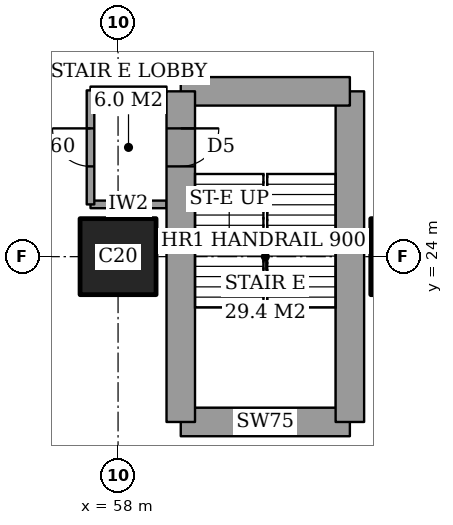
"""IFC4 building model, lengths in metres.
Left out: names, types, materials, properties, quantities, classifications, styles, units other than length and angle.
Written with IfcOpenShell. Run it as: python <this file> out.ifc"""

import sys

from ifc_helpers import new_model, si_unit, direction, frame, frame_2d, origin, origin_2d, place, context, subcontext, project, spatial, rectangle, extrude, element, fill, save


model = new_model("IFC4")
c1 = context("Model", 3, precision=1e-05, world=origin(), true_north=direction((0.0, 1.0)))
c2 = subcontext(c1, "Body", "Model", "MODEL_VIEW")
j1 = project(units=[si_unit("LENGTHUNIT", "METRE"), si_unit("PLANEANGLEUNIT", "RADIAN")], contexts=[c1])
p1 = place(None, origin())
s1 = spatial("IfcSite", under=j1, at=p1, CompositionType="ELEMENT")
p2 = place(p1, origin())
s2 = spatial("IfcBuilding", under=s1, at=p2, CompositionType="ELEMENT")
p3 = place(p2, frame((0.0, 0.0, -5.0)))
s3 = spatial("IfcBuildingStorey", under=s2, at=p3, CompositionType="ELEMENT", Elevation=-5.0)
for number, where, z_axis, x_axis in (
    (1, (58.0, 24.0, 0.0), (0.0, 0.0, 1.0), (1.0, 0.0, 0.0)),
    (2, (65.65, 24.0, 0.0), (0.0, 0.0, 1.0), (1.0, 0.0, 0.0)),
):
    element("IfcColumn", number, at=place(p3, frame(where, z_axis=z_axis, x_axis=x_axis)), inside=s3, PredefinedType="COLUMN", context=c2, shape_type="SweptSolid", body=[
        extrude(rectangle(XDim=2.0, YDim=2.0, at=origin_2d()), origin(), (0.0, 0.0, 1.0), 5.0),
    ])
p4 = place(p3, frame((59.65, 19.65, 0.0), z_axis=(0.0, 0.0, 1.0), x_axis=(1.0, 0.0, 0.0)))
e3 = element("IfcWall", 3, at=p4, inside=s3, PredefinedType="SHEAR", context=c2, shape_type="SweptSolid", body=[
    extrude(rectangle(XDim=4.45, YDim=0.75, at=frame_2d((2.225, 0.0))), origin(), (0.0, 0.0, 1.0), 5.0),
])
p5 = place(p3, frame((64.1, 19.65, 0.0), z_axis=(0.0, 0.0, 1.0), x_axis=(0.0, 1.0, 0.0)))
e4 = element("IfcWall", 4, at=p5, inside=s3, PredefinedType="SHEAR", context=c2, shape_type="SweptSolid", body=[
    extrude(rectangle(XDim=8.7, YDim=0.75, at=frame_2d((4.35, 0.0))), origin(), (0.0, 0.0, 1.0), 5.0),
])
p6 = place(p3, frame((64.1, 28.35, 0.0), z_axis=(0.0, 0.0, 1.0), x_axis=(-1.0, 0.0, 0.0)))
e5 = element("IfcWall", 5, at=p6, inside=s3, PredefinedType="SHEAR", context=c2, shape_type="SweptSolid", body=[
    extrude(rectangle(XDim=4.45, YDim=0.75, at=frame_2d((2.225, 0.0))), origin(), (0.0, 0.0, 1.0), 5.0),
])
p7 = place(p3, frame((59.65, 28.35, 0.0), z_axis=(0.0, 0.0, 1.0), x_axis=(0.0, -1.0, 0.0)))
e6 = element("IfcWall", 6, at=p7, inside=s3, PredefinedType="SHEAR", context=c2, shape_type="SweptSolid", body=[
    extrude(rectangle(XDim=8.7, YDim=0.75, at=frame_2d((4.35, 0.0))), origin(), (0.0, 0.0, 1.0), 5.0),
])
p8 = place(p7, frame((0.975, 0.0, 0.0)))
e7 = element("IfcOpeningElement", 7, at=p8, cuts=e6, PredefinedType="OPENING", context=c2, shape_type="SweptSolid", body=[
    extrude(rectangle(XDim=1.0, YDim=2.1, at=frame_2d((0.5, 1.05))), frame((0.0, 0.385, 0.0), z_axis=(0.0, -1.0, 0.0), x_axis=(1.0, 0.0, 0.0)), (0.0, 0.0, 1.0), 0.77),
])
for number, where, z_axis, x_axis in (
    (8, (57.275, 25.375, 0.0), (0.0, 0.0, 1.0), (1.0, 0.0, 0.0)),
    (9, (57.275, 28.375, 0.0), (0.0, 0.0, 1.0), (1.0, 0.0, 0.0)),
):
    element("IfcWall", number, at=place(p3, frame(where, z_axis=z_axis, x_axis=x_axis)), inside=s3, PredefinedType="PARTITIONING", context=c2, shape_type="SweptSolid", body=[
        extrude(rectangle(XDim=2.0, YDim=0.2, at=frame_2d((1.0, 0.0))), origin(), (0.0, 0.0, 1.0), 4.7),
    ])
p9 = place(p3, frame((57.275, 25.375, 0.0), z_axis=(0.0, 0.0, 1.0), x_axis=(0.0, 1.0, 0.0)))
e10 = element("IfcWall", 10, at=p9, inside=s3, PredefinedType="PARTITIONING", context=c2, shape_type="SweptSolid", body=[
    extrude(rectangle(XDim=3.0, YDim=0.2, at=frame_2d((1.5, 0.0))), origin(), (0.0, 0.0, 1.0), 4.7),
])
p10 = place(p9, frame((1.0, 0.0, 0.0)))
e11 = element("IfcOpeningElement", 11, at=p10, cuts=e10, PredefinedType="OPENING", context=c2, shape_type="SweptSolid", body=[
    extrude(rectangle(XDim=1.0, YDim=2.1, at=frame_2d((0.5, 1.05))), frame((0.0, 0.11, 0.0), z_axis=(0.0, -1.0, 0.0), x_axis=(1.0, 0.0, 0.0)), (0.0, 0.0, 1.0), 0.22),
])
p11 = place(p10, origin())
e12 = element("IfcDoor", 12, at=p11, inside=s3, OperationType="SINGLE_SWING_LEFT", PredefinedType="DOOR", context=c2, shape_type="SweptSolid", body=[
    extrude(rectangle(XDim=1.0, YDim=2.1, at=frame_2d((0.5, 1.05))), frame((0.0, 0.025, 0.0), z_axis=(0.0, -1.0, 0.0), x_axis=(1.0, 0.0, 0.0)), (0.0, 0.0, 1.0), 0.05),
])
fill(e11, e12)
p12 = place(p8, origin())
e13 = element("IfcDoor", 13, at=p12, inside=s3, OperationType="SINGLE_SWING_RIGHT", PredefinedType="DOOR", context=c2, shape_type="SweptSolid", body=[
    extrude(rectangle(XDim=1.0, YDim=2.1, at=frame_2d((0.5, 1.05))), frame((0.0, 0.025, 0.0), z_axis=(0.0, -1.0, 0.0), x_axis=(1.0, 0.0, 0.0)), (0.0, 0.0, 1.0), 0.05),
])
fill(e7, e13)
save(model, sys.argv[1])
